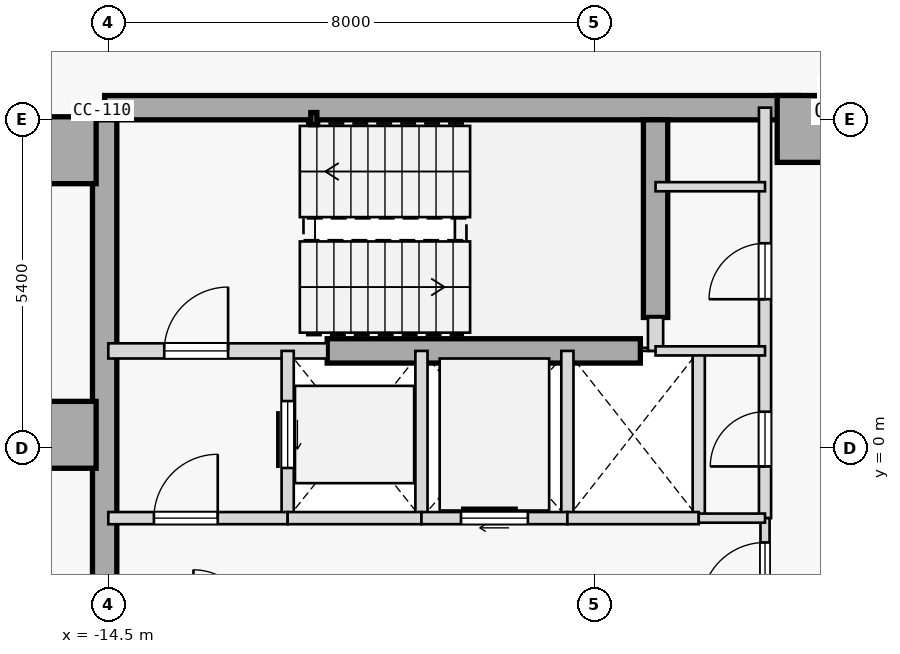
"""IFC4 building model, lengths in metres.
Left out: names, types, materials, properties, quantities, classifications, styles, units other than length and angle.
Written with IfcOpenShell. Run it as: python <this file> out.ifc"""

import sys

from ifc_helpers import new_model, si_unit, direction, frame, frame_2d, origin, origin_2d, place, context, subcontext, project, spatial, rectangle, hollow_rectangle, extrude, element, fill, save


model = new_model("IFC4")
c1 = context("Model", 3, precision=1e-05, world=origin(), true_north=direction((0.0, 1.0)))
c2 = subcontext(c1, "Body", "Model", "MODEL_VIEW")
j1 = project(units=[si_unit("LENGTHUNIT", "METRE"), si_unit("PLANEANGLEUNIT", "RADIAN")], contexts=[c1])
p1 = place(None, origin())
s1 = spatial("IfcSite", under=j1, at=p1, CompositionType="ELEMENT")
p2 = place(p1, origin())
s2 = spatial("IfcBuilding", under=s1, at=p2, CompositionType="ELEMENT")
p3 = place(p2, frame((0.0, 0.0, 139.2)))
s3 = spatial("IfcBuildingStorey", under=s2, at=p3, CompositionType="ELEMENT", Elevation=139.2)
for number, where, z_axis, x_axis in (
    (1, (-15.25, 4.9, 0.0), (0.0, 0.0, 1.0), (1.0, 0.0, 0.0)),
    (2, (-15.25, 0.22, 0.0), (0.0, 0.0, 1.0), (1.0, 0.0, 0.0)),
    (3, (-2.95, 5.25, 0.0), (0.0, 0.0, 1.0), (1.0, 0.0, 0.0)),
):
    element("IfcColumn", number, at=place(p3, frame(where, z_axis=z_axis, x_axis=x_axis)), inside=s3, PredefinedType="COLUMN", context=c2, shape_type="SweptSolid", body=[
        extrude(rectangle(XDim=1.1, YDim=1.1, at=origin_2d()), origin(), (0.0, 0.0, 1.0), 3.7),
    ])
p4 = place(p3, frame((-14.56, 5.6, 0.0), z_axis=(0.0, 0.0, 1.0), x_axis=(1.0, 0.0, 0.0)))
e4 = element("IfcWall", 4, at=p4, inside=s3, PredefinedType="SHEAR", context=c2, shape_type="SweptSolid", body=[
    extrude(rectangle(XDim=11.41, YDim=0.4, at=frame_2d((5.705, 0.0))), origin(), (0.0, 0.0, 1.0), 3.3),
])
p5 = place(p3, frame((-14.56, -5.4, 0.0), z_axis=(0.0, 0.0, 1.0), x_axis=(0.0, 1.0, 0.0)))
e5 = element("IfcWall", 5, at=p5, inside=s3, PredefinedType="SHEAR", context=c2, shape_type="SweptSolid", body=[
    extrude(rectangle(XDim=10.8, YDim=0.4, at=frame_2d((5.4, 0.0))), origin(), (0.0, 0.0, 1.0), 3.3),
])
p6 = place(p3, frame((-5.5, 2.15, 0.0), z_axis=(0.0, 0.0, 1.0), x_axis=(0.0, 1.0, 0.0)))
e6 = element("IfcWall", 6, at=p6, inside=s3, PredefinedType="SHEAR", context=c2, shape_type="SweptSolid", body=[
    extrude(rectangle(XDim=3.25, YDim=0.4, at=frame_2d((1.625, 0.0))), origin(), (0.0, 0.0, 1.0), 3.3),
])
p7 = place(p3, frame((-10.9, 1.6, 0.0), z_axis=(0.0, 0.0, 1.0), x_axis=(1.0, 0.0, 0.0)))
e7 = element("IfcWall", 7, at=p7, inside=s3, PredefinedType="SHEAR", context=c2, shape_type="SweptSolid", body=[
    extrude(rectangle(XDim=5.15, YDim=0.4, at=frame_2d((2.575, 0.0))), origin(), (0.0, 0.0, 1.0), 3.3),
])
p8 = place(p3, frame((-11.12, 5.42, 0.0), z_axis=(0.0, 0.0, 1.0), x_axis=(1.0, 0.0, 0.0)))
e8 = element("IfcColumn", 8, at=p8, inside=s3, PredefinedType="COLUMN", context=c2, shape_type="SweptSolid", body=[
    extrude(hollow_rectangle(XDim=0.1, YDim=0.2, WallThickness=0.008, at=origin_2d()), origin(), (0.0, 0.0, 1.0), 3.7),
])
p9 = place(p3, frame((-14.5, 1.6, 0.0), z_axis=(0.0, 0.0, 1.0), x_axis=(1.0, 0.0, 0.0)))
e9 = element("IfcWall", 9, at=p9, inside=s3, PredefinedType="STANDARD", context=c2, shape_type="SweptSolid", body=[
    extrude(rectangle(XDim=3.6, YDim=0.25, at=frame_2d((1.8, 0.0))), origin(), (0.0, 0.0, 1.0), 3.3),
])
p10 = place(p9, frame((0.92, 0.0, 0.0)))
e10 = element("IfcOpeningElement", 10, at=p10, cuts=e9, PredefinedType="OPENING", context=c2, shape_type="SweptSolid", body=[
    extrude(rectangle(XDim=1.05, YDim=2.15, at=frame_2d((0.525, 1.075))), frame((0.0, 0.135, 0.0), z_axis=(0.0, -1.0, 0.0), x_axis=(1.0, 0.0, 0.0)), (0.0, 0.0, 1.0), 0.27),
])
p11 = place(p3, frame((-5.5, 1.6, 0.0), z_axis=(0.0, 0.0, 1.0), x_axis=(0.0, 1.0, 0.0)))
e11 = element("IfcWall", 11, at=p11, inside=s3, PredefinedType="STANDARD", context=c2, shape_type="SweptSolid", body=[
    extrude(rectangle(XDim=0.55, YDim=0.25, at=frame_2d((0.275, 0.0))), origin(), (0.0, 0.0, 1.0), 3.3),
])
p12 = place(p3, frame((-3.7, -1.15, 0.0), z_axis=(0.0, 0.0, 1.0), x_axis=(0.0, 1.0, 0.0)))
e12 = element("IfcWall", 12, at=p12, inside=s3, PredefinedType="STANDARD", context=c2, shape_type="SweptSolid", body=[
    extrude(rectangle(XDim=6.75, YDim=0.2, at=frame_2d((3.375, 0.0))), origin(), (0.0, 0.0, 1.0), 3.3),
])
p13 = place(p12, frame((3.6, 0.0, 0.0)))
e13 = element("IfcOpeningElement", 13, at=p13, cuts=e12, PredefinedType="OPENING", context=c2, shape_type="SweptSolid", body=[
    extrude(rectangle(XDim=0.92, YDim=2.15, at=frame_2d((0.46, 1.075))), frame((0.0, 0.11, 0.0), z_axis=(0.0, -1.0, 0.0), x_axis=(1.0, 0.0, 0.0)), (0.0, 0.0, 1.0), 0.22),
])
p14 = place(p12, frame((0.85, 0.0, 0.0)))
e14 = element("IfcOpeningElement", 14, at=p14, cuts=e12, PredefinedType="OPENING", context=c2, shape_type="SweptSolid", body=[
    extrude(rectangle(XDim=0.9, YDim=2.15, at=frame_2d((0.45, 1.075))), frame((0.0, 0.11, 0.0), z_axis=(0.0, -1.0, 0.0), x_axis=(1.0, 0.0, 0.0)), (0.0, 0.0, 1.0), 0.22),
])
p15 = place(p3, frame((-3.7, -2.95, 0.0), z_axis=(0.0, 0.0, 1.0), x_axis=(0.0, 1.0, 0.0)))
e15 = element("IfcWall", 15, at=p15, inside=s3, PredefinedType="PARTITIONING", context=c2, shape_type="SweptSolid", body=[
    extrude(rectangle(XDim=1.8, YDim=0.15, at=frame_2d((0.9, 0.0))), origin(), (0.0, 0.0, 1.0), 3.3),
])
p16 = place(p15, frame((0.35, 0.0, 0.0)))
e16 = element("IfcOpeningElement", 16, at=p16, cuts=e15, PredefinedType="OPENING", context=c2, shape_type="SweptSolid", body=[
    extrude(rectangle(XDim=1.05, YDim=2.18, at=frame_2d((0.525, 1.09))), frame((0.0, 0.085, 0.0), z_axis=(0.0, -1.0, 0.0), x_axis=(1.0, 0.0, 0.0)), (0.0, 0.0, 1.0), 0.17),
])
p17 = place(p3, frame((-11.55, -1.15, 0.0), z_axis=(0.0, 0.0, 1.0), x_axis=(0.0, 1.0, 0.0)))
e17 = element("IfcWall", 17, at=p17, inside=s3, PredefinedType="STANDARD", context=c2, shape_type="SweptSolid", body=[
    extrude(rectangle(XDim=2.75, YDim=0.2, at=frame_2d((1.375, 0.0))), origin(), (0.0, 0.0, 1.0), 3.3),
])
p18 = place(p17, frame((0.825, 0.0, 0.0)))
e18 = element("IfcOpeningElement", 18, at=p18, cuts=e17, PredefinedType="OPENING", context=c2, shape_type="SweptSolid", body=[
    extrude(rectangle(XDim=1.1, YDim=2.15, at=frame_2d((0.55, 1.075))), frame((0.0, 0.11, 0.0), z_axis=(0.0, -1.0, 0.0), x_axis=(1.0, 0.0, 0.0)), (0.0, 0.0, 1.0), 0.22),
])
p19 = place(p3, frame((-9.35, -1.15, 0.0), z_axis=(0.0, 0.0, 1.0), x_axis=(0.0, 1.0, 0.0)))
e19 = element("IfcWall", 19, at=p19, inside=s3, PredefinedType="STANDARD", context=c2, shape_type="SweptSolid", body=[
    extrude(rectangle(XDim=2.75, YDim=0.2, at=frame_2d((1.375, 0.0))), origin(), (0.0, 0.0, 1.0), 3.3),
])
p20 = place(p3, frame((-14.5, -1.15, 0.0), z_axis=(0.0, 0.0, 1.0), x_axis=(1.0, 0.0, 0.0)))
e20 = element("IfcWall", 20, at=p20, inside=s3, PredefinedType="STANDARD", context=c2, shape_type="SweptSolid", body=[
    extrude(rectangle(XDim=2.95, YDim=0.2, at=frame_2d((1.475, 0.0))), origin(), (0.0, 0.0, 1.0), 3.3),
])
p21 = place(p20, frame((0.75, 0.0, 0.0)))
e21 = element("IfcOpeningElement", 21, at=p21, cuts=e20, PredefinedType="OPENING", context=c2, shape_type="SweptSolid", body=[
    extrude(rectangle(XDim=1.05, YDim=2.18, at=frame_2d((0.525, 1.09))), frame((0.0, 0.11, 0.0), z_axis=(0.0, -1.0, 0.0), x_axis=(1.0, 0.0, 0.0)), (0.0, 0.0, 1.0), 0.22),
])
p22 = place(p3, frame((-11.55, -1.15, 0.0), z_axis=(0.0, 0.0, 1.0), x_axis=(1.0, 0.0, 0.0)))
e22 = element("IfcWall", 22, at=p22, inside=s3, PredefinedType="STANDARD", context=c2, shape_type="SweptSolid", body=[
    extrude(rectangle(XDim=2.2, YDim=0.2, at=frame_2d((1.1, 0.0))), origin(), (0.0, 0.0, 1.0), 3.3),
])
p23 = place(p3, frame((-6.95, -1.15, 0.0), z_axis=(0.0, 0.0, 1.0), x_axis=(0.0, 1.0, 0.0)))
e23 = element("IfcWall", 23, at=p23, inside=s3, PredefinedType="STANDARD", context=c2, shape_type="SweptSolid", body=[
    extrude(rectangle(XDim=2.75, YDim=0.2, at=frame_2d((1.375, 0.0))), origin(), (0.0, 0.0, 1.0), 3.3),
])
p24 = place(p3, frame((-9.35, -1.15, 0.0), z_axis=(0.0, 0.0, 1.0), x_axis=(1.0, 0.0, 0.0)))
e24 = element("IfcWall", 24, at=p24, inside=s3, PredefinedType="STANDARD", context=c2, shape_type="SweptSolid", body=[
    extrude(rectangle(XDim=2.4, YDim=0.2, at=frame_2d((1.2, 0.0))), origin(), (0.0, 0.0, 1.0), 3.3),
])
p25 = place(p24, frame((0.65, 0.0, 0.0)))
e25 = element("IfcOpeningElement", 25, at=p25, cuts=e24, PredefinedType="OPENING", context=c2, shape_type="SweptSolid", body=[
    extrude(rectangle(XDim=1.1, YDim=2.15, at=frame_2d((0.55, 1.075))), frame((0.0, 0.11, 0.0), z_axis=(0.0, -1.0, 0.0), x_axis=(1.0, 0.0, 0.0)), (0.0, 0.0, 1.0), 0.22),
])
p26 = place(p3, frame((-4.79, -1.15, 0.0), z_axis=(0.0, 0.0, 1.0), x_axis=(0.0, 1.0, 0.0)))
e26 = element("IfcWall", 26, at=p26, inside=s3, PredefinedType="STANDARD", context=c2, shape_type="SweptSolid", body=[
    extrude(rectangle(XDim=2.75, YDim=0.2, at=frame_2d((1.375, 0.0))), origin(), (0.0, 0.0, 1.0), 3.3),
])
p27 = place(p3, frame((-6.95, -1.15, 0.0), z_axis=(0.0, 0.0, 1.0), x_axis=(1.0, 0.0, 0.0)))
e27 = element("IfcWall", 27, at=p27, inside=s3, PredefinedType="STANDARD", context=c2, shape_type="SweptSolid", body=[
    extrude(rectangle(XDim=2.16, YDim=0.2, at=frame_2d((1.08, 0.0))), origin(), (0.0, 0.0, 1.0), 3.3),
])
p28 = place(p3, frame((-4.79, -1.15, 0.0), z_axis=(0.0, 0.0, 1.0), x_axis=(1.0, 0.0, 0.0)))
e28 = element("IfcWall", 28, at=p28, inside=s3, PredefinedType="PARTITIONING", context=c2, shape_type="SweptSolid", body=[
    extrude(rectangle(XDim=1.09, YDim=0.15, at=frame_2d((0.545, 0.0))), origin(), (0.0, 0.0, 1.0), 3.3),
])
for number, where, z_axis, x_axis in (
    (29, (-5.5, 4.3, 0.0), (0.0, 0.0, 1.0), (1.0, 0.0, 0.0)),
    (30, (-5.5, 1.6, 0.0), (0.0, 0.0, 1.0), (1.0, 0.0, 0.0)),
):
    element("IfcWall", number, at=place(p3, frame(where, z_axis=z_axis, x_axis=x_axis)), inside=s3, PredefinedType="PARTITIONING", context=c2, shape_type="SweptSolid", body=[
        extrude(rectangle(XDim=1.8, YDim=0.15, at=frame_2d((0.9, 0.0))), origin(), (0.0, 0.0, 1.0), 3.3),
    ])
p29 = place(p10, origin())
e31 = element("IfcDoor", 31, at=p29, inside=s3, OperationType="SINGLE_SWING_RIGHT", PredefinedType="DOOR", context=c2, shape_type="SweptSolid", body=[
    extrude(rectangle(XDim=1.05, YDim=2.15, at=frame_2d((0.525, 1.075))), frame((0.0, 0.025, 0.0), z_axis=(0.0, -1.0, 0.0), x_axis=(1.0, 0.0, 0.0)), (0.0, 0.0, 1.0), 0.05),
])
fill(e10, e31)
p30 = place(p21, origin())
e32 = element("IfcDoor", 32, at=p30, inside=s3, OperationType="SINGLE_SWING_RIGHT", PredefinedType="DOOR", context=c2, shape_type="SweptSolid", body=[
    extrude(rectangle(XDim=1.05, YDim=2.18, at=frame_2d((0.525, 1.09))), frame((0.0, 0.025, 0.0), z_axis=(0.0, -1.0, 0.0), x_axis=(1.0, 0.0, 0.0)), (0.0, 0.0, 1.0), 0.05),
])
fill(e21, e32)
p31 = place(p16, origin())
e33 = element("IfcDoor", 33, at=p31, inside=s3, OperationType="SINGLE_SWING_LEFT", PredefinedType="DOOR", context=c2, shape_type="SweptSolid", body=[
    extrude(rectangle(XDim=1.05, YDim=2.18, at=frame_2d((0.525, 1.09))), frame((0.0, 0.025, 0.0), z_axis=(0.0, -1.0, 0.0), x_axis=(1.0, 0.0, 0.0)), (0.0, 0.0, 1.0), 0.05),
])
fill(e16, e33)
p32 = place(p18, origin())
e34 = element("IfcDoor", 34, at=p32, inside=s3, OperationType="SLIDING_TO_RIGHT", PredefinedType="DOOR", context=c2, shape_type="SweptSolid", body=[
    extrude(rectangle(XDim=1.1, YDim=2.15, at=frame_2d((0.55, 1.075))), frame((0.0, 0.025, 0.0), z_axis=(0.0, -1.0, 0.0), x_axis=(1.0, 0.0, 0.0)), (0.0, 0.0, 1.0), 0.05),
])
fill(e18, e34)
p33 = place(p25, origin())
e35 = element("IfcDoor", 35, at=p33, inside=s3, OperationType="SLIDING_TO_RIGHT", PredefinedType="DOOR", context=c2, shape_type="SweptSolid", body=[
    extrude(rectangle(XDim=1.1, YDim=2.15, at=frame_2d((0.55, 1.075))), frame((0.0, 0.025, 0.0), z_axis=(0.0, -1.0, 0.0), x_axis=(1.0, 0.0, 0.0)), (0.0, 0.0, 1.0), 0.05),
])
fill(e25, e35)
p34 = place(p13, origin())
e36 = element("IfcDoor", 36, at=p34, inside=s3, OperationType="SINGLE_SWING_LEFT", PredefinedType="DOOR", context=c2, shape_type="SweptSolid", body=[
    extrude(rectangle(XDim=0.92, YDim=2.15, at=frame_2d((0.46, 1.075))), frame((0.0, 0.025, 0.0), z_axis=(0.0, -1.0, 0.0), x_axis=(1.0, 0.0, 0.0)), (0.0, 0.0, 1.0), 0.05),
])
fill(e13, e36)
p35 = place(p14, origin())
e37 = element("IfcDoor", 37, at=p35, inside=s3, OperationType="SINGLE_SWING_LEFT", PredefinedType="DOOR", context=c2, shape_type="SweptSolid", body=[
    extrude(rectangle(XDim=0.9, YDim=2.15, at=frame_2d((0.45, 1.075))), frame((0.0, 0.025, 0.0), z_axis=(0.0, -1.0, 0.0), x_axis=(1.0, 0.0, 0.0)), (0.0, 0.0, 1.0), 0.05),
])
fill(e14, e37)
save(model, sys.argv[1])
